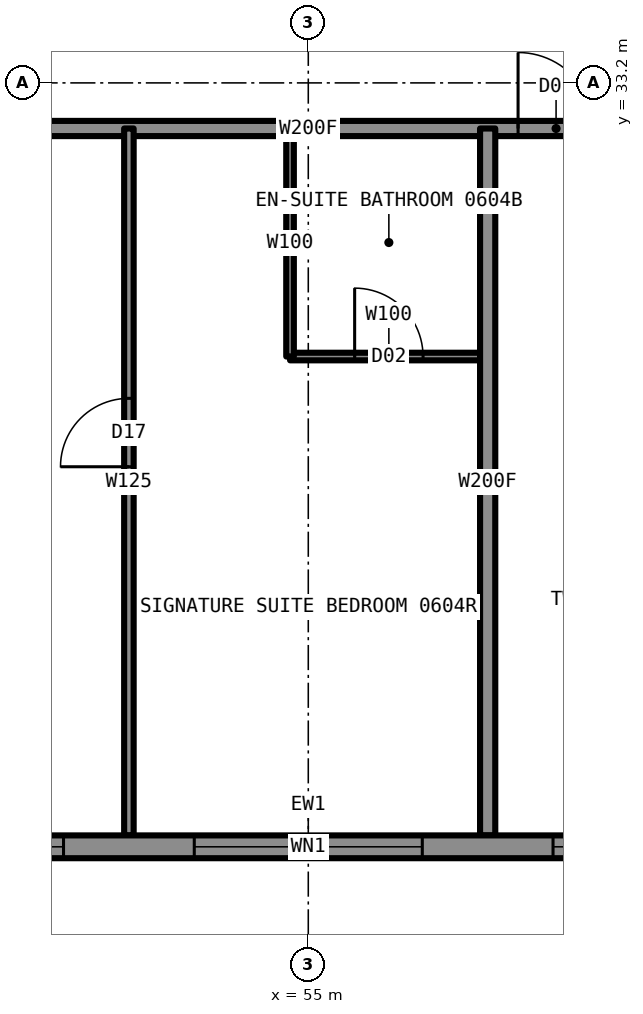
"""IFC4 building model, lengths in metres.
Left out: names, types, materials, properties, quantities, classifications, styles, units other than length and angle.
Written with IfcOpenShell. Run it as: python <this file> out.ifc"""

import sys

from ifc_helpers import new_model, si_unit, direction, frame, frame_2d, origin, place, context, subcontext, project, spatial, rectangle, extrude, element, fill, save


model = new_model("IFC4")
c1 = context("Model", 3, precision=1e-05, world=origin(), true_north=direction((0.0, 1.0)))
c2 = subcontext(c1, "Body", "Model", "MODEL_VIEW")
j1 = project(units=[si_unit("LENGTHUNIT", "METRE"), si_unit("PLANEANGLEUNIT", "RADIAN")], contexts=[c1])
p1 = place(None, origin())
s1 = spatial("IfcSite", under=j1, at=p1, CompositionType="ELEMENT")
p2 = place(p1, origin())
s2 = spatial("IfcBuilding", under=s1, at=p2, CompositionType="ELEMENT")
p3 = place(p2, frame((0.0, 0.0, 28.5)))
s3 = spatial("IfcBuildingStorey", under=s2, at=p3, CompositionType="ELEMENT", Elevation=28.5)
p4 = place(p3, frame((43.2, 32.6, 0.0), z_axis=(0.0, 0.0, 1.0), x_axis=(1.0, 0.0, 0.0)))
e1 = element("IfcWall", 1, at=p4, inside=s3, PredefinedType="PARTITIONING", context=c2, shape_type="SweptSolid", body=[
    extrude(rectangle(XDim=23.6, YDim=0.2, at=frame_2d((11.8, 0.0))), origin(), (0.0, 0.0, 1.0), 3.33),
])
p5 = place(p4, frame((1.85, 0.0, 0.0)))
e2 = element("IfcOpeningElement", 2, at=p5, cuts=e1, PredefinedType="OPENING", context=c2, shape_type="SweptSolid", body=[
    extrude(rectangle(XDim=1.1, YDim=2.2, at=frame_2d((0.55, 1.1))), frame((0.0, 0.11, 0.0), z_axis=(0.0, -1.0, 0.0), x_axis=(1.0, 0.0, 0.0)), (0.0, 0.0, 1.0), 0.22),
])
p6 = place(p4, frame((14.56, 0.0, 0.0)))
e3 = element("IfcOpeningElement", 3, at=p6, cuts=e1, PredefinedType="OPENING", context=c2, shape_type="SweptSolid", body=[
    extrude(rectangle(XDim=1.0, YDim=2.2, at=frame_2d((0.5, 1.1))), frame((0.0, 0.11, 0.0), z_axis=(0.0, -1.0, 0.0), x_axis=(1.0, 0.0, 0.0)), (0.0, 0.0, 1.0), 0.22),
])
p7 = place(p4, frame((19.28, 0.0, 0.0)))
e4 = element("IfcOpeningElement", 4, at=p7, cuts=e1, PredefinedType="OPENING", context=c2, shape_type="SweptSolid", body=[
    extrude(rectangle(XDim=1.0, YDim=2.2, at=frame_2d((0.5, 1.1))), frame((0.0, 0.11, 0.0), z_axis=(0.0, -1.0, 0.0), x_axis=(1.0, 0.0, 0.0)), (0.0, 0.0, 1.0), 0.22),
])
p8 = place(p3, frame((54.76, 29.6, 0.0), z_axis=(0.0, 0.0, 1.0), x_axis=(1.0, 0.0, 0.0)))
e5 = element("IfcWall", 5, at=p8, inside=s3, PredefinedType="PARTITIONING", context=c2, shape_type="SweptSolid", body=[
    extrude(rectangle(XDim=2.6, YDim=0.1, at=frame_2d((1.3, 0.0))), origin(), (0.0, 0.0, 1.0), 3.33),
])
p9 = place(p8, frame((0.85, 0.0, 0.0)))
e6 = element("IfcOpeningElement", 6, at=p9, cuts=e5, PredefinedType="OPENING", context=c2, shape_type="SweptSolid", body=[
    extrude(rectangle(XDim=0.9, YDim=2.1, at=frame_2d((0.45, 1.05))), frame((0.0, 0.06, 0.0), z_axis=(0.0, -1.0, 0.0), x_axis=(1.0, 0.0, 0.0)), (0.0, 0.0, 1.0), 0.12),
])
p10 = place(p3, frame((54.76, 29.6, 0.0), z_axis=(0.0, 0.0, 1.0), x_axis=(0.0, 1.0, 0.0)))
e7 = element("IfcWall", 7, at=p10, inside=s3, PredefinedType="PARTITIONING", context=c2, shape_type="SweptSolid", body=[
    extrude(rectangle(XDim=3.0, YDim=0.1, at=frame_2d((1.5, 0.0))), origin(), (0.0, 0.0, 1.0), 3.33),
])
p11 = place(p3, frame((52.64, 23.3, 0.0), z_axis=(0.0, 0.0, 1.0), x_axis=(0.0, 1.0, 0.0)))
e8 = element("IfcWall", 8, at=p11, inside=s3, PredefinedType="PARTITIONING", context=c2, shape_type="SweptSolid", body=[
    extrude(rectangle(XDim=9.3, YDim=0.125, at=frame_2d((4.65, 0.0))), origin(), (0.0, 0.0, 1.0), 3.33),
])
p12 = place(p11, frame((4.85, 0.0, 0.0)))
e9 = element("IfcOpeningElement", 9, at=p12, cuts=e8, PredefinedType="OPENING", context=c2, shape_type="SweptSolid", body=[
    extrude(rectangle(XDim=0.9, YDim=2.2, at=frame_2d((0.45, 1.1))), frame((0.0, 0.073, 0.0), z_axis=(0.0, -1.0, 0.0), x_axis=(1.0, 0.0, 0.0)), (0.0, 0.0, 1.0), 0.145),
])
p13 = place(p3, frame((57.36, 23.3, 0.0), z_axis=(0.0, 0.0, 1.0), x_axis=(0.0, 1.0, 0.0)))
e10 = element("IfcWall", 10, at=p13, inside=s3, PredefinedType="PARTITIONING", context=c2, shape_type="SweptSolid", body=[
    extrude(rectangle(XDim=9.3, YDim=0.2, at=frame_2d((4.65, 0.0))), origin(), (0.0, 0.0, 1.0), 3.33),
])
p14 = place(p3, frame((38.5, 23.15, 0.0), z_axis=(0.0, 0.0, 1.0), x_axis=(1.0, 0.0, 0.0)))
e11 = element("IfcWall", 11, at=p14, inside=s3, PredefinedType="SOLIDWALL", context=c2, shape_type="SweptSolid", body=[
    extrude(rectangle(XDim=33.0, YDim=0.3, at=frame_2d((16.5, 0.0))), origin(), (0.0, 0.0, 1.0), 2.83),
])
p15 = place(p14, frame((0.85, 0.0, 0.5)))
e12 = element("IfcOpeningElement", 12, at=p15, cuts=e11, PredefinedType="OPENING", context=c2, shape_type="SweptSolid", body=[
    extrude(rectangle(XDim=3.0, YDim=2.0, at=frame_2d((1.5, 1.0))), frame((0.0, 0.16, 0.0), z_axis=(0.0, -1.0, 0.0), x_axis=(1.0, 0.0, 0.0)), (0.0, 0.0, 1.0), 0.32),
])
p16 = place(p14, frame((5.56, 0.0, 0.5)))
e13 = element("IfcOpeningElement", 13, at=p16, cuts=e11, PredefinedType="OPENING", context=c2, shape_type="SweptSolid", body=[
    extrude(rectangle(XDim=3.0, YDim=2.0, at=frame_2d((1.5, 1.0))), frame((0.0, 0.16, 0.0), z_axis=(0.0, -1.0, 0.0), x_axis=(1.0, 0.0, 0.0)), (0.0, 0.0, 1.0), 0.32),
])
p17 = place(p14, frame((10.28, 0.0, 0.5)))
e14 = element("IfcOpeningElement", 14, at=p17, cuts=e11, PredefinedType="OPENING", context=c2, shape_type="SweptSolid", body=[
    extrude(rectangle(XDim=3.0, YDim=2.0, at=frame_2d((1.5, 1.0))), frame((0.0, 0.16, 0.0), z_axis=(0.0, -1.0, 0.0), x_axis=(1.0, 0.0, 0.0)), (0.0, 0.0, 1.0), 0.32),
])
p18 = place(p14, frame((15.0, 0.0, 0.5)))
e15 = element("IfcOpeningElement", 15, at=p18, cuts=e11, PredefinedType="OPENING", context=c2, shape_type="SweptSolid", body=[
    extrude(rectangle(XDim=3.0, YDim=2.0, at=frame_2d((1.5, 1.0))), frame((0.0, 0.16, 0.0), z_axis=(0.0, -1.0, 0.0), x_axis=(1.0, 0.0, 0.0)), (0.0, 0.0, 1.0), 0.32),
])
p19 = place(p14, frame((19.72, 0.0, 0.5)))
e16 = element("IfcOpeningElement", 16, at=p19, cuts=e11, PredefinedType="OPENING", context=c2, shape_type="SweptSolid", body=[
    extrude(rectangle(XDim=3.0, YDim=2.0, at=frame_2d((1.5, 1.0))), frame((0.0, 0.16, 0.0), z_axis=(0.0, -1.0, 0.0), x_axis=(1.0, 0.0, 0.0)), (0.0, 0.0, 1.0), 0.32),
])
p20 = place(p14, frame((24.44, 0.0, 0.5)))
e17 = element("IfcOpeningElement", 17, at=p20, cuts=e11, PredefinedType="OPENING", context=c2, shape_type="SweptSolid", body=[
    extrude(rectangle(XDim=3.0, YDim=2.0, at=frame_2d((1.5, 1.0))), frame((0.0, 0.16, 0.0), z_axis=(0.0, -1.0, 0.0), x_axis=(1.0, 0.0, 0.0)), (0.0, 0.0, 1.0), 0.32),
])
p21 = place(p14, frame((29.15, 0.0, 0.5)))
e18 = element("IfcOpeningElement", 18, at=p21, cuts=e11, PredefinedType="OPENING", context=c2, shape_type="SweptSolid", body=[
    extrude(rectangle(XDim=3.0, YDim=2.0, at=frame_2d((1.5, 1.0))), frame((0.0, 0.16, 0.0), z_axis=(0.0, -1.0, 0.0), x_axis=(1.0, 0.0, 0.0)), (0.0, 0.0, 1.0), 0.32),
])
p22 = place(p9, origin())
e19 = element("IfcDoor", 19, at=p22, inside=s3, OperationType="SINGLE_SWING_RIGHT", PredefinedType="DOOR", context=c2, shape_type="SweptSolid", body=[
    extrude(rectangle(XDim=0.9, YDim=2.1, at=frame_2d((0.45, 1.05))), frame((0.0, 0.025, 0.0), z_axis=(0.0, -1.0, 0.0), x_axis=(1.0, 0.0, 0.0)), (0.0, 0.0, 1.0), 0.05),
])
fill(e6, e19)
p23 = place(p12, origin())
e20 = element("IfcDoor", 20, at=p23, inside=s3, OperationType="SINGLE_SWING_LEFT", PredefinedType="DOOR", context=c2, shape_type="SweptSolid", body=[
    extrude(rectangle(XDim=0.9, YDim=2.2, at=frame_2d((0.45, 1.1))), frame((0.0, 0.025, 0.0), z_axis=(0.0, -1.0, 0.0), x_axis=(1.0, 0.0, 0.0)), (0.0, 0.0, 1.0), 0.05),
])
fill(e9, e20)
p24 = place(p6, origin())
e21 = element("IfcDoor", 21, at=p24, inside=s3, OperationType="SINGLE_SWING_LEFT", PredefinedType="DOOR", context=c2, shape_type="SweptSolid", body=[
    extrude(rectangle(XDim=1.0, YDim=2.2, at=frame_2d((0.5, 1.1))), frame((0.0, 0.025, 0.0), z_axis=(0.0, -1.0, 0.0), x_axis=(1.0, 0.0, 0.0)), (0.0, 0.0, 1.0), 0.05),
])
fill(e3, e21)
p25 = place(p17, origin())
e22 = element("IfcWindow", 22, at=p25, inside=s3, PartitioningType="SINGLE_PANEL", PredefinedType="WINDOW", context=c2, shape_type="SweptSolid", body=[
    extrude(rectangle(XDim=3.0, YDim=2.0, at=frame_2d((1.5, 1.0))), frame((0.0, 0.03, 0.0), z_axis=(0.0, -1.0, 0.0), x_axis=(1.0, 0.0, 0.0)), (0.0, 0.0, 1.0), 0.06),
])
fill(e14, e22)
p26 = place(p18, origin())
e23 = element("IfcWindow", 23, at=p26, inside=s3, PartitioningType="SINGLE_PANEL", PredefinedType="WINDOW", context=c2, shape_type="SweptSolid", body=[
    extrude(rectangle(XDim=3.0, YDim=2.0, at=frame_2d((1.5, 1.0))), frame((0.0, 0.03, 0.0), z_axis=(0.0, -1.0, 0.0), x_axis=(1.0, 0.0, 0.0)), (0.0, 0.0, 1.0), 0.06),
])
fill(e15, e23)
p27 = place(p19, origin())
e24 = element("IfcWindow", 24, at=p27, inside=s3, PartitioningType="SINGLE_PANEL", PredefinedType="WINDOW", context=c2, shape_type="SweptSolid", body=[
    extrude(rectangle(XDim=3.0, YDim=2.0, at=frame_2d((1.5, 1.0))), frame((0.0, 0.03, 0.0), z_axis=(0.0, -1.0, 0.0), x_axis=(1.0, 0.0, 0.0)), (0.0, 0.0, 1.0), 0.06),
])
fill(e16, e24)
save(model, sys.argv[1])
